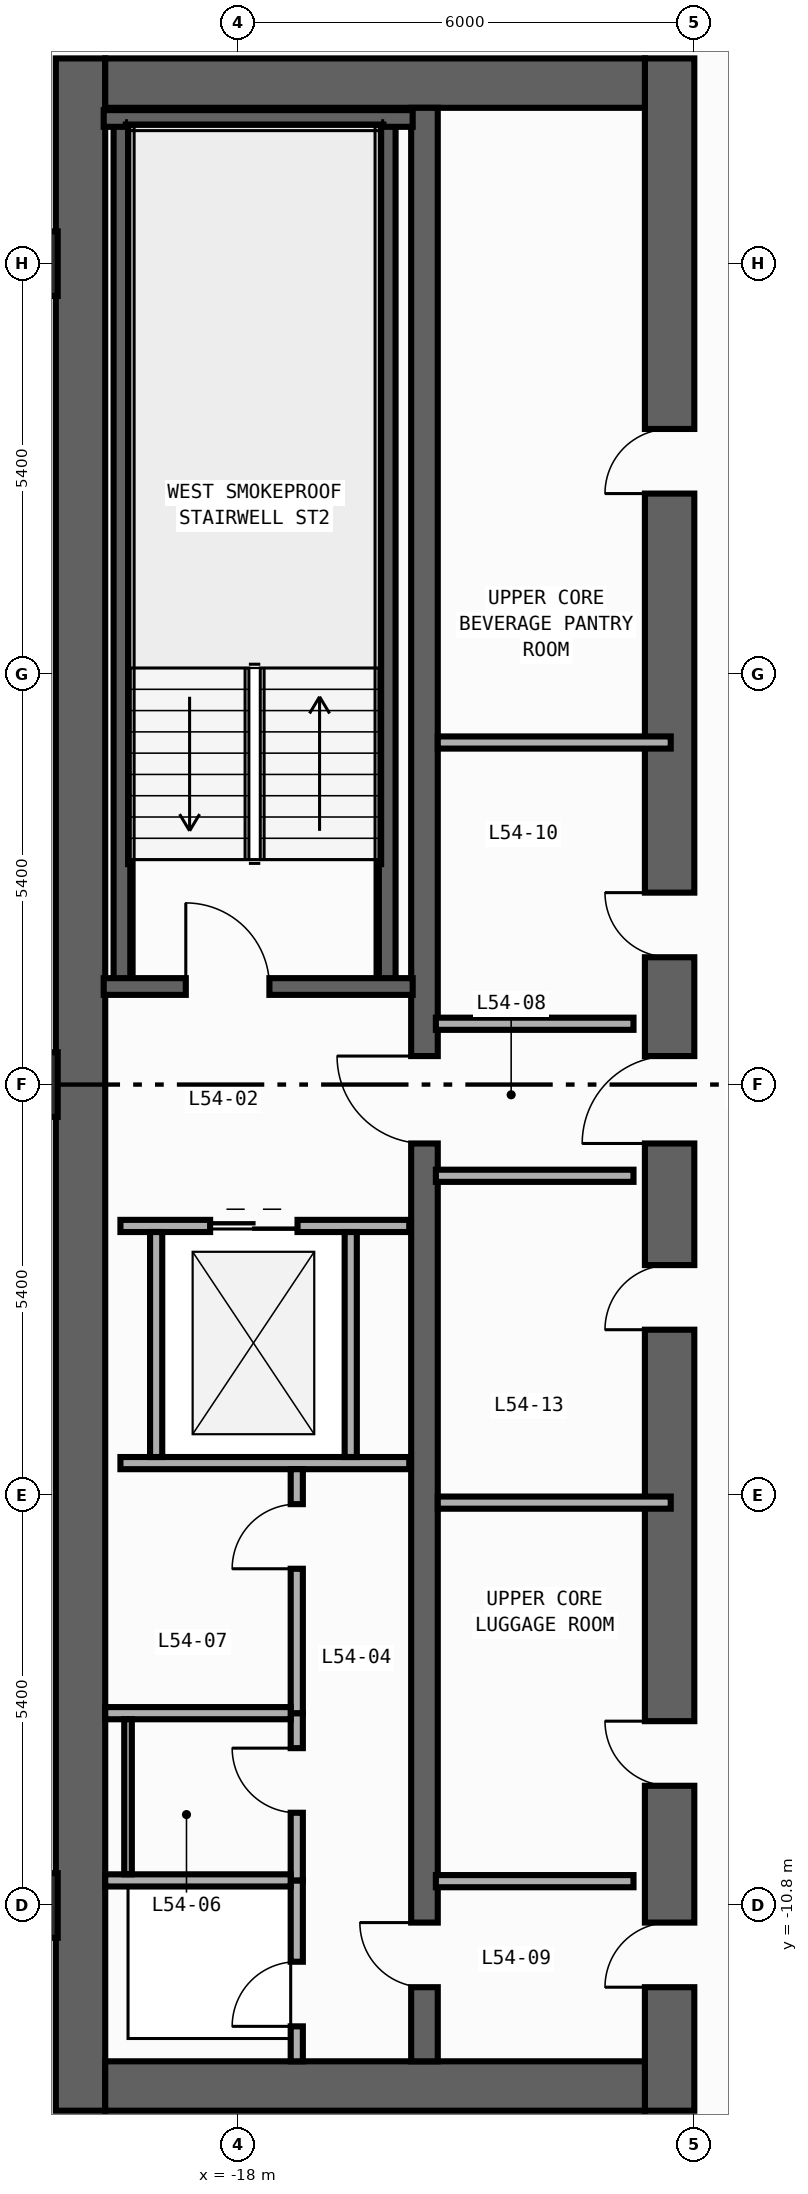
"""IFC4 building model, lengths in metres.
Left out: names, types, materials, properties, quantities, classifications, styles, units other than length and angle.
Written with IfcOpenShell. Run it as: python <this file> out.ifc"""

import sys

from ifc_helpers import new_model, si_unit, direction, frame, frame_2d, origin, origin_2d, place, context, subcontext, project, spatial, rectangle, extrude, element, fill, save


model = new_model("IFC4")
c1 = context("Model", 3, precision=1e-05, world=origin(), true_north=direction((0.0, 1.0)))
c2 = subcontext(c1, "Body", "Model", "MODEL_VIEW")
j1 = project(units=[si_unit("LENGTHUNIT", "METRE"), si_unit("PLANEANGLEUNIT", "RADIAN")], contexts=[c1])
p1 = place(None, origin())
s1 = spatial("IfcSite", under=j1, at=p1, CompositionType="ELEMENT")
p2 = place(p1, origin())
s2 = spatial("IfcBuilding", under=s1, at=p2, CompositionType="ELEMENT")
p3 = place(p2, frame((0.0, 0.0, 233.2)))
s3 = spatial("IfcBuildingStorey", under=s2, at=p3, CompositionType="ELEMENT", Elevation=233.2)
p4 = place(p3, frame((-20.075, -13.5, 0.0), z_axis=(0.0, 0.0, 1.0), x_axis=(0.0, 1.0, 0.0)))
e1 = element("IfcWall", 1, at=p4, inside=s3, PredefinedType="SHEAR", context=c2, shape_type="SweptSolid", body=[
    extrude(rectangle(XDim=27.0, YDim=0.65, at=frame_2d((13.5, 0.0))), origin(), (0.0, 0.0, 1.0), 3.34),
])
p5 = place(p3, frame((-12.325, -13.5, 0.0), z_axis=(0.0, 0.0, 1.0), x_axis=(0.0, 1.0, 0.0)))
e2 = element("IfcWall", 2, at=p5, inside=s3, PredefinedType="SHEAR", context=c2, shape_type="SweptSolid", body=[
    extrude(rectangle(XDim=27.0, YDim=0.65, at=frame_2d((13.5, 0.0))), origin(), (0.0, 0.0, 1.0), 3.34),
])
p6 = place(p5, frame((15.175, 0.0, 0.0)))
e3 = element("IfcOpeningElement", 3, at=p6, cuts=e2, PredefinedType="OPENING", context=c2, shape_type="SweptSolid", body=[
    extrude(rectangle(XDim=0.85, YDim=2.1, at=frame_2d((0.425, 1.05))), frame((0.0, 0.335, 0.0), z_axis=(0.0, -1.0, 0.0), x_axis=(1.0, 0.0, 0.0)), (0.0, 0.0, 1.0), 0.67),
])
p7 = place(p5, frame((21.275, 0.0, 0.0)))
e4 = element("IfcOpeningElement", 4, at=p7, cuts=e2, PredefinedType="OPENING", context=c2, shape_type="SweptSolid", body=[
    extrude(rectangle(XDim=0.85, YDim=2.1, at=frame_2d((0.425, 1.05))), frame((0.0, 0.335, 0.0), z_axis=(0.0, -1.0, 0.0), x_axis=(1.0, 0.0, 0.0)), (0.0, 0.0, 1.0), 0.67),
])
p8 = place(p5, frame((4.275, 0.0, 0.0)))
e5 = element("IfcOpeningElement", 5, at=p8, cuts=e2, PredefinedType="OPENING", context=c2, shape_type="SweptSolid", body=[
    extrude(rectangle(XDim=0.85, YDim=2.1, at=frame_2d((0.425, 1.05))), frame((0.0, 0.335, 0.0), z_axis=(0.0, -1.0, 0.0), x_axis=(1.0, 0.0, 0.0)), (0.0, 0.0, 1.0), 0.67),
])
p9 = place(p5, frame((10.275, 0.0, 0.0)))
e6 = element("IfcOpeningElement", 6, at=p9, cuts=e2, PredefinedType="OPENING", context=c2, shape_type="SweptSolid", body=[
    extrude(rectangle(XDim=0.85, YDim=2.1, at=frame_2d((0.425, 1.05))), frame((0.0, 0.335, 0.0), z_axis=(0.0, -1.0, 0.0), x_axis=(1.0, 0.0, 0.0)), (0.0, 0.0, 1.0), 0.67),
])
p10 = place(p5, frame((12.725, 0.0, 0.0)))
e7 = element("IfcOpeningElement", 7, at=p10, cuts=e2, PredefinedType="OPENING", context=c2, shape_type="SweptSolid", body=[
    extrude(rectangle(XDim=1.15, YDim=2.2, at=frame_2d((0.575, 1.1))), frame((0.0, 0.335, 0.0), z_axis=(0.0, -1.0, 0.0), x_axis=(1.0, 0.0, 0.0)), (0.0, 0.0, 1.0), 0.67),
])
p11 = place(p5, frame((1.625, 0.0, 0.0)))
e8 = element("IfcOpeningElement", 8, at=p11, cuts=e2, PredefinedType="OPENING", context=c2, shape_type="SweptSolid", body=[
    extrude(rectangle(XDim=0.85, YDim=2.1, at=frame_2d((0.425, 1.05))), frame((0.0, 0.335, 0.0), z_axis=(0.0, -1.0, 0.0), x_axis=(1.0, 0.0, 0.0)), (0.0, 0.0, 1.0), 0.67),
])
for number, where, z_axis, x_axis in (
    (9, (-19.75, -13.175, 0.0), (0.0, 0.0, 1.0), (1.0, 0.0, 0.0)),
    (10, (-19.75, 13.175, 0.0), (0.0, 0.0, 1.0), (1.0, 0.0, 0.0)),
):
    element("IfcWall", number, at=place(p3, frame(where, z_axis=z_axis, x_axis=x_axis)), inside=s3, PredefinedType="SHEAR", context=c2, shape_type="SweptSolid", body=[
        extrude(rectangle(XDim=7.1, YDim=0.65, at=frame_2d((3.55, 0.0))), origin(), (0.0, 0.0, 1.0), 3.34),
    ])
p12 = place(p3, frame((-15.55, -12.85, 0.0), z_axis=(0.0, 0.0, 1.0), x_axis=(0.0, 1.0, 0.0)))
e11 = element("IfcWall", 11, at=p12, inside=s3, PredefinedType="SHEAR", context=c2, shape_type="SweptSolid", body=[
    extrude(rectangle(XDim=25.7, YDim=0.35, at=frame_2d((12.85, 0.0))), origin(), (0.0, 0.0, 1.0), 3.34),
])
p13 = place(p12, frame((12.075, 0.0, 0.0)))
e12 = element("IfcOpeningElement", 12, at=p13, cuts=e11, PredefinedType="OPENING", context=c2, shape_type="SweptSolid", body=[
    extrude(rectangle(XDim=1.15, YDim=2.2, at=frame_2d((0.575, 1.1))), frame((0.0, 0.185, 0.0), z_axis=(0.0, -1.0, 0.0), x_axis=(1.0, 0.0, 0.0)), (0.0, 0.0, 1.0), 0.37),
])
p14 = place(p12, frame((0.975, 0.0, 0.0)))
e13 = element("IfcOpeningElement", 13, at=p14, cuts=e11, PredefinedType="OPENING", context=c2, shape_type="SweptSolid", body=[
    extrude(rectangle(XDim=0.85, YDim=2.1, at=frame_2d((0.425, 1.05))), frame((0.0, 0.185, 0.0), z_axis=(0.0, -1.0, 0.0), x_axis=(1.0, 0.0, 0.0)), (0.0, 0.0, 1.0), 0.37),
])
for number, where, z_axis, x_axis in (
    (14, (-16.04, 1.29, 0.0), (0.0, 0.0, 1.0), (0.0, 1.0, 0.0)),
    (15, (-19.53, 1.29, 0.0), (0.0, 0.0, 1.0), (0.0, 1.0, 0.0)),
):
    element("IfcWall", number, at=place(p3, frame(where, z_axis=z_axis, x_axis=x_axis)), inside=s3, PredefinedType="SHEAR", context=c2, shape_type="SweptSolid", body=[
        extrude(rectangle(XDim=11.42, YDim=0.22, at=frame_2d((5.71, 0.0))), origin(), (0.0, 0.0, 1.0), 3.34),
    ])
p15 = place(p3, frame((-19.77, 12.71, 0.0), z_axis=(0.0, 0.0, 1.0), x_axis=(1.0, 0.0, 0.0)))
e16 = element("IfcWall", 16, at=p15, inside=s3, PredefinedType="SHEAR", context=c2, shape_type="SweptSolid", body=[
    extrude(rectangle(XDim=4.065, YDim=0.22, at=frame_2d((2.032, 0.0))), origin(), (0.0, 0.0, 1.0), 3.34),
])
p16 = place(p3, frame((-19.77, 1.29, 0.0), z_axis=(0.0, 0.0, 1.0), x_axis=(1.0, 0.0, 0.0)))
e17 = element("IfcWall", 17, at=p16, inside=s3, PredefinedType="SHEAR", context=c2, shape_type="SweptSolid", body=[
    extrude(rectangle(XDim=4.065, YDim=0.22, at=frame_2d((2.032, 0.0))), origin(), (0.0, 0.0, 1.0), 3.34),
])
p17 = place(p16, frame((1.08, 0.0, 0.0)))
e18 = element("IfcOpeningElement", 18, at=p17, cuts=e17, PredefinedType="OPENING", context=c2, shape_type="SweptSolid", body=[
    extrude(rectangle(XDim=1.1, YDim=2.2, at=frame_2d((0.55, 1.1))), frame((0.0, 0.12, 0.0), z_axis=(0.0, -1.0, 0.0), x_axis=(1.0, 0.0, 0.0)), (0.0, 0.0, 1.0), 0.24),
])
for number, where, z_axis, x_axis in (
    (19, (-20.8, -10.8, 0.0), (0.0, 0.0, 1.0), (1.0, 0.0, 0.0)),
    (20, (-20.8, 0.0, 0.0), (0.0, 0.0, 1.0), (1.0, 0.0, 0.0)),
    (21, (-20.8, 10.8, 0.0), (0.0, 0.0, 1.0), (1.0, 0.0, 0.0)),
):
    element("IfcColumn", number, at=place(p3, frame(where, z_axis=z_axis, x_axis=x_axis)), inside=s3, PredefinedType="COLUMN", context=c2, shape_type="SweptSolid", body=[
        extrude(rectangle(XDim=0.85, YDim=0.85, at=origin_2d()), origin(), (0.0, 0.0, 1.0), 3.6),
    ])
p18 = place(p3, frame((-19.55, -1.86, 0.0), z_axis=(0.0, 0.0, 1.0), x_axis=(1.0, 0.0, 0.0)))
e22 = element("IfcWall", 22, at=p18, inside=s3, PredefinedType="STANDARD", context=c2, shape_type="SweptSolid", body=[
    extrude(rectangle(XDim=3.8, YDim=0.16, at=frame_2d((1.9, 0.0))), origin(), (0.0, 0.0, 1.0), 3.34),
])
p19 = place(p18, frame((1.18, 0.0, 0.0)))
e23 = element("IfcOpeningElement", 23, at=p19, cuts=e22, PredefinedType="OPENING", context=c2, shape_type="SweptSolid", body=[
    extrude(rectangle(XDim=1.15, YDim=2.2, at=frame_2d((0.575, 1.1))), frame((0.0, 0.09, 0.0), z_axis=(0.0, -1.0, 0.0), x_axis=(1.0, 0.0, 0.0)), (0.0, 0.0, 1.0), 0.18),
])
p20 = place(p3, frame((-19.55, -4.98, 0.0), z_axis=(0.0, 0.0, 1.0), x_axis=(1.0, 0.0, 0.0)))
e24 = element("IfcWall", 24, at=p20, inside=s3, PredefinedType="STANDARD", context=c2, shape_type="SweptSolid", body=[
    extrude(rectangle(XDim=3.8, YDim=0.16, at=frame_2d((1.9, 0.0))), origin(), (0.0, 0.0, 1.0), 3.34),
])
for number, where, z_axis, x_axis in (
    (25, (-19.08, -4.9, 0.0), (0.0, 0.0, 1.0), (0.0, 1.0, 0.0)),
    (26, (-16.52, -4.9, 0.0), (0.0, 0.0, 1.0), (0.0, 1.0, 0.0)),
):
    element("IfcWall", number, at=place(p3, frame(where, z_axis=z_axis, x_axis=x_axis)), inside=s3, PredefinedType="STANDARD", context=c2, shape_type="SweptSolid", body=[
        extrude(rectangle(XDim=2.96, YDim=0.16, at=frame_2d((1.48, 0.0))), origin(), (0.0, 0.0, 1.0), 3.34),
    ])
for number, where, z_axis, x_axis in (
    (27, (-15.4, 0.8, 0.0), (0.0, 0.0, 1.0), (1.0, 0.0, 0.0)),
    (28, (-15.4, -1.2, 0.0), (0.0, 0.0, 1.0), (1.0, 0.0, 0.0)),
    (29, (-15.4, -10.48, 0.0), (0.0, 0.0, 1.0), (1.0, 0.0, 0.0)),
):
    element("IfcWall", number, at=place(p3, frame(where, z_axis=z_axis, x_axis=x_axis)), inside=s3, PredefinedType="STANDARD", context=c2, shape_type="SweptSolid", body=[
        extrude(rectangle(XDim=2.6, YDim=0.16, at=frame_2d((1.3, 0.0))), origin(), (0.0, 0.0, 1.0), 3.34),
    ])
p21 = place(p3, frame((-17.23, -12.85, 0.0), z_axis=(0.0, 0.0, 1.0), x_axis=(0.0, 1.0, 0.0)))
e30 = element("IfcWall", 30, at=p21, inside=s3, PredefinedType="PARTITIONING", context=c2, shape_type="SweptSolid", body=[
    extrude(rectangle(XDim=2.38, YDim=0.16, at=frame_2d((1.19, 0.0))), origin(), (0.0, 0.0, 1.0), 3.34),
])
p22 = place(p21, frame((0.46, 0.0, 0.0)))
e31 = element("IfcOpeningElement", 31, at=p22, cuts=e30, PredefinedType="OPENING", context=c2, shape_type="SweptSolid", body=[
    extrude(rectangle(XDim=0.85, YDim=2.1, at=frame_2d((0.425, 1.05))), frame((0.0, 0.09, 0.0), z_axis=(0.0, -1.0, 0.0), x_axis=(1.0, 0.0, 0.0)), (0.0, 0.0, 1.0), 0.18),
])
p23 = place(p3, frame((-17.23, -10.47, 0.0), z_axis=(0.0, 0.0, 1.0), x_axis=(0.0, 1.0, 0.0)))
e32 = element("IfcWall", 32, at=p23, inside=s3, PredefinedType="PARTITIONING", context=c2, shape_type="SweptSolid", body=[
    extrude(rectangle(XDim=2.2, YDim=0.16, at=frame_2d((1.1, 0.0))), origin(), (0.0, 0.0, 1.0), 3.34),
])
p24 = place(p23, frame((0.89, 0.0, 0.0)))
e33 = element("IfcOpeningElement", 33, at=p24, cuts=e32, PredefinedType="OPENING", context=c2, shape_type="SweptSolid", body=[
    extrude(rectangle(XDim=0.85, YDim=2.1, at=frame_2d((0.425, 1.05))), frame((0.0, 0.09, 0.0), z_axis=(0.0, -1.0, 0.0), x_axis=(1.0, 0.0, 0.0)), (0.0, 0.0, 1.0), 0.18),
])
p25 = place(p3, frame((-17.23, -8.27, 0.0), z_axis=(0.0, 0.0, 1.0), x_axis=(0.0, 1.0, 0.0)))
e34 = element("IfcWall", 34, at=p25, inside=s3, PredefinedType="PARTITIONING", context=c2, shape_type="SweptSolid", body=[
    extrude(rectangle(XDim=3.21, YDim=0.16, at=frame_2d((1.605, 0.0))), origin(), (0.0, 0.0, 1.0), 3.34),
])
p26 = place(p25, frame((1.9, 0.0, 0.0)))
e35 = element("IfcOpeningElement", 35, at=p26, cuts=e34, PredefinedType="OPENING", context=c2, shape_type="SweptSolid", body=[
    extrude(rectangle(XDim=0.85, YDim=2.1, at=frame_2d((0.425, 1.05))), frame((0.0, 0.09, 0.0), z_axis=(0.0, -1.0, 0.0), x_axis=(1.0, 0.0, 0.0)), (0.0, 0.0, 1.0), 0.18),
])
for number, where, z_axis, x_axis in (
    (36, (-19.75, -10.47, 0.0), (0.0, 0.0, 1.0), (1.0, 0.0, 0.0)),
    (37, (-19.75, -8.27, 0.0), (0.0, 0.0, 1.0), (1.0, 0.0, 0.0)),
):
    element("IfcWall", number, at=place(p3, frame(where, z_axis=z_axis, x_axis=x_axis)), inside=s3, PredefinedType="PARTITIONING", context=c2, shape_type="SweptSolid", body=[
        extrude(rectangle(XDim=2.44, YDim=0.16, at=frame_2d((1.22, 0.0))), origin(), (0.0, 0.0, 1.0), 3.34),
    ])
for number, where, z_axis, x_axis in (
    (38, (-15.375, 4.5, 0.0), (0.0, 0.0, 1.0), (1.0, 0.0, 0.0)),
    (39, (-15.375, -5.5, 0.0), (0.0, 0.0, 1.0), (1.0, 0.0, 0.0)),
):
    element("IfcWall", number, at=place(p3, frame(where, z_axis=z_axis, x_axis=x_axis)), inside=s3, PredefinedType="PARTITIONING", context=c2, shape_type="SweptSolid", body=[
        extrude(rectangle(XDim=3.065, YDim=0.16, at=frame_2d((1.532, 0.0))), origin(), (0.0, 0.0, 1.0), 3.34),
    ])
p27 = place(p3, frame((-19.45, -10.39, 0.0), z_axis=(0.0, 0.0, 1.0), x_axis=(0.0, 1.0, 0.0)))
e40 = element("IfcWall", 40, at=p27, inside=s3, PredefinedType="PARTITIONING", context=c2, shape_type="SweptSolid", body=[
    extrude(rectangle(XDim=2.04, YDim=0.1, at=frame_2d((1.02, 0.0))), origin(), (0.0, 0.0, 1.0), 3.34),
])
p28 = place(p17, origin())
e41 = element("IfcDoor", 41, at=p28, inside=s3, OperationType="SINGLE_SWING_LEFT", PredefinedType="DOOR", context=c2, shape_type="SweptSolid", body=[
    extrude(rectangle(XDim=1.1, YDim=2.2, at=frame_2d((0.55, 1.1))), frame((0.0, 0.025, 0.0), z_axis=(0.0, -1.0, 0.0), x_axis=(1.0, 0.0, 0.0)), (0.0, 0.0, 1.0), 0.05),
])
fill(e18, e41)
p29 = place(p6, origin())
e42 = element("IfcDoor", 42, at=p29, inside=s3, OperationType="SINGLE_SWING_RIGHT", PredefinedType="DOOR", context=c2, shape_type="SweptSolid", body=[
    extrude(rectangle(XDim=0.85, YDim=2.1, at=frame_2d((0.425, 1.05))), frame((0.0, 0.025, 0.0), z_axis=(0.0, -1.0, 0.0), x_axis=(1.0, 0.0, 0.0)), (0.0, 0.0, 1.0), 0.05),
])
fill(e3, e42)
p30 = place(p7, origin())
e43 = element("IfcDoor", 43, at=p30, inside=s3, OperationType="SINGLE_SWING_LEFT", PredefinedType="DOOR", context=c2, shape_type="SweptSolid", body=[
    extrude(rectangle(XDim=0.85, YDim=2.1, at=frame_2d((0.425, 1.05))), frame((0.0, 0.025, 0.0), z_axis=(0.0, -1.0, 0.0), x_axis=(1.0, 0.0, 0.0)), (0.0, 0.0, 1.0), 0.05),
])
fill(e4, e43)
p31 = place(p8, origin())
e44 = element("IfcDoor", 44, at=p31, inside=s3, OperationType="SINGLE_SWING_RIGHT", PredefinedType="DOOR", context=c2, shape_type="SweptSolid", body=[
    extrude(rectangle(XDim=0.85, YDim=2.1, at=frame_2d((0.425, 1.05))), frame((0.0, 0.025, 0.0), z_axis=(0.0, -1.0, 0.0), x_axis=(1.0, 0.0, 0.0)), (0.0, 0.0, 1.0), 0.05),
])
fill(e5, e44)
p32 = place(p9, origin())
e45 = element("IfcDoor", 45, at=p32, inside=s3, OperationType="SINGLE_SWING_LEFT", PredefinedType="DOOR", context=c2, shape_type="SweptSolid", body=[
    extrude(rectangle(XDim=0.85, YDim=2.1, at=frame_2d((0.425, 1.05))), frame((0.0, 0.025, 0.0), z_axis=(0.0, -1.0, 0.0), x_axis=(1.0, 0.0, 0.0)), (0.0, 0.0, 1.0), 0.05),
])
fill(e6, e45)
p33 = place(p10, origin())
e46 = element("IfcDoor", 46, at=p33, inside=s3, OperationType="SINGLE_SWING_LEFT", PredefinedType="DOOR", context=c2, shape_type="SweptSolid", body=[
    extrude(rectangle(XDim=1.15, YDim=2.2, at=frame_2d((0.575, 1.1))), frame((0.0, 0.025, 0.0), z_axis=(0.0, -1.0, 0.0), x_axis=(1.0, 0.0, 0.0)), (0.0, 0.0, 1.0), 0.05),
])
fill(e7, e46)
p34 = place(p13, origin())
e47 = element("IfcDoor", 47, at=p34, inside=s3, OperationType="SINGLE_SWING_RIGHT", PredefinedType="DOOR", context=c2, shape_type="SweptSolid", body=[
    extrude(rectangle(XDim=1.15, YDim=2.2, at=frame_2d((0.575, 1.1))), frame((0.0, 0.025, 0.0), z_axis=(0.0, -1.0, 0.0), x_axis=(1.0, 0.0, 0.0)), (0.0, 0.0, 1.0), 0.05),
])
fill(e12, e47)
p35 = place(p11, origin())
e48 = element("IfcDoor", 48, at=p35, inside=s3, OperationType="SINGLE_SWING_LEFT", PredefinedType="DOOR", context=c2, shape_type="SweptSolid", body=[
    extrude(rectangle(XDim=0.85, YDim=2.1, at=frame_2d((0.425, 1.05))), frame((0.0, 0.025, 0.0), z_axis=(0.0, -1.0, 0.0), x_axis=(1.0, 0.0, 0.0)), (0.0, 0.0, 1.0), 0.05),
])
fill(e8, e48)
p36 = place(p14, origin())
e49 = element("IfcDoor", 49, at=p36, inside=s3, OperationType="SINGLE_SWING_RIGHT", PredefinedType="DOOR", context=c2, shape_type="SweptSolid", body=[
    extrude(rectangle(XDim=0.85, YDim=2.1, at=frame_2d((0.425, 1.05))), frame((0.0, 0.025, 0.0), z_axis=(0.0, -1.0, 0.0), x_axis=(1.0, 0.0, 0.0)), (0.0, 0.0, 1.0), 0.05),
])
fill(e13, e49)
p37 = place(p19, origin())
e50 = element("IfcDoor", 50, at=p37, inside=s3, OperationType="DOUBLE_DOOR_SLIDING", PredefinedType="DOOR", context=c2, shape_type="SweptSolid", body=[
    extrude(rectangle(XDim=1.15, YDim=2.2, at=frame_2d((0.575, 1.1))), frame((0.0, 0.025, 0.0), z_axis=(0.0, -1.0, 0.0), x_axis=(1.0, 0.0, 0.0)), (0.0, 0.0, 1.0), 0.05),
])
fill(e23, e50)
p38 = place(p22, origin())
e51 = element("IfcDoor", 51, at=p38, inside=s3, OperationType="SINGLE_SWING_LEFT", PredefinedType="DOOR", context=c2, shape_type="SweptSolid", body=[
    extrude(rectangle(XDim=0.85, YDim=2.1, at=frame_2d((0.425, 1.05))), frame((0.0, 0.025, 0.0), z_axis=(0.0, -1.0, 0.0), x_axis=(1.0, 0.0, 0.0)), (0.0, 0.0, 1.0), 0.05),
])
fill(e31, e51)
p39 = place(p24, origin())
e52 = element("IfcDoor", 52, at=p39, inside=s3, OperationType="SINGLE_SWING_RIGHT", PredefinedType="DOOR", context=c2, shape_type="SweptSolid", body=[
    extrude(rectangle(XDim=0.85, YDim=2.1, at=frame_2d((0.425, 1.05))), frame((0.0, 0.025, 0.0), z_axis=(0.0, -1.0, 0.0), x_axis=(1.0, 0.0, 0.0)), (0.0, 0.0, 1.0), 0.05),
])
fill(e33, e52)
p40 = place(p26, origin())
e53 = element("IfcDoor", 53, at=p40, inside=s3, OperationType="SINGLE_SWING_LEFT", PredefinedType="DOOR", context=c2, shape_type="SweptSolid", body=[
    extrude(rectangle(XDim=0.85, YDim=2.1, at=frame_2d((0.425, 1.05))), frame((0.0, 0.025, 0.0), z_axis=(0.0, -1.0, 0.0), x_axis=(1.0, 0.0, 0.0)), (0.0, 0.0, 1.0), 0.05),
])
fill(e35, e53)
save(model, sys.argv[1])
